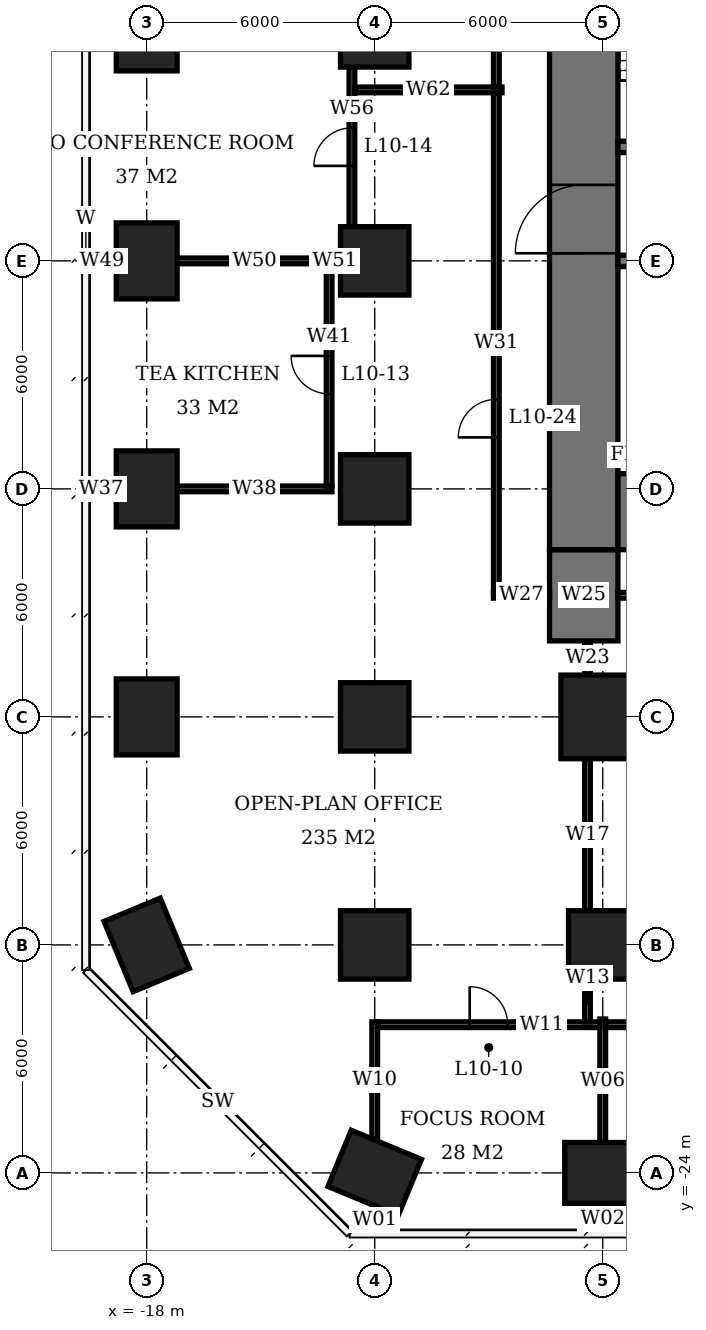
"""IFC4 building model, lengths in metres.
Left out: names, types, materials, properties, quantities, classifications, styles, units other than length and angle.
Written with IfcOpenShell. Run it as: python <this file> out.ifc"""

import sys

from ifc_helpers import new_model, si_unit, direction, frame, frame_2d, origin, origin_2d, place, context, subcontext, project, spatial, rectangle, extrude, element, fill, save


model = new_model("IFC4")
c1 = context("Model", 3, precision=1e-05, world=origin(), true_north=direction((0.0, 1.0)))
c2 = subcontext(c1, "Body", "Model", "MODEL_VIEW")
j1 = project(units=[si_unit("LENGTHUNIT", "METRE"), si_unit("PLANEANGLEUNIT", "RADIAN")], contexts=[c1])
p1 = place(None, origin())
s1 = spatial("IfcSite", under=j1, at=p1, CompositionType="ELEMENT")
p2 = place(p1, origin())
s2 = spatial("IfcBuilding", under=s1, at=p2, CompositionType="ELEMENT")
p3 = place(p2, frame((0.0, 0.0, 45.5)))
s3 = spatial("IfcBuildingStorey", under=s2, at=p3, CompositionType="ELEMENT", Elevation=45.5)
for number, where, z_axis, x_axis in (
    (1, (-18.0, -18.0, 0.0), (0.0, 0.0, 1.0), (-0.383, 0.924, 0.0)),
    (2, (-18.0, -12.0, 0.0), (0.0, 0.0, 1.0), (0.0, 1.0, 0.0)),
    (3, (-18.0, -6.0, 0.0), (0.0, 0.0, 1.0), (0.0, 1.0, 0.0)),
    (4, (-18.0, 0.0, 0.0), (0.0, 0.0, 1.0), (0.0, 1.0, 0.0)),
    (5, (-18.0, 6.0, 0.0), (0.0, 0.0, 1.0), (0.0, 1.0, 0.0)),
    (6, (-12.0, -24.0, 0.0), (0.0, 0.0, 1.0), (-0.924, 0.383, 0.0)),
):
    element("IfcColumn", number, at=place(p3, frame(where, z_axis=z_axis, x_axis=x_axis)), inside=s3, PredefinedType="COLUMN", context=c2, shape_type="SweptSolid", body=[
        extrude(rectangle(XDim=2.0, YDim=1.6, at=origin_2d()), origin(), (0.0, 0.0, 1.0), 3.9),
    ])
for number, where, z_axis, x_axis in (
    (7, (-12.0, -18.0, 0.0), (0.0, 0.0, 1.0), (1.0, 0.0, 0.0)),
    (8, (-12.0, -12.0, 0.0), (0.0, 0.0, 1.0), (1.0, 0.0, 0.0)),
    (9, (-12.0, -6.0, 0.0), (0.0, 0.0, 1.0), (1.0, 0.0, 0.0)),
    (10, (-12.0, 0.0, 0.0), (0.0, 0.0, 1.0), (1.0, 0.0, 0.0)),
    (11, (-12.0, 6.0, 0.0), (0.0, 0.0, 1.0), (1.0, 0.0, 0.0)),
):
    element("IfcColumn", number, at=place(p3, frame(where, z_axis=z_axis, x_axis=x_axis)), inside=s3, PredefinedType="COLUMN", context=c2, shape_type="SweptSolid", body=[
        extrude(rectangle(XDim=1.8, YDim=1.8, at=origin_2d()), origin(), (0.0, 0.0, 1.0), 3.9),
    ])
p4 = place(p3, frame((-6.0, -24.0, 0.0), z_axis=(0.0, 0.0, 1.0), x_axis=(1.0, 0.0, 0.0)))
e12 = element("IfcColumn", 12, at=p4, inside=s3, PredefinedType="COLUMN", context=c2, shape_type="SweptSolid", body=[
    extrude(rectangle(XDim=2.0, YDim=1.6, at=origin_2d()), origin(), (0.0, 0.0, 1.0), 3.9),
])
p5 = place(p3, frame((-6.0, -18.0, 0.0), z_axis=(0.0, 0.0, 1.0), x_axis=(1.0, 0.0, 0.0)))
e13 = element("IfcColumn", 13, at=p5, inside=s3, PredefinedType="COLUMN", context=c2, shape_type="SweptSolid", body=[
    extrude(rectangle(XDim=1.8, YDim=1.8, at=origin_2d()), origin(), (0.0, 0.0, 1.0), 3.9),
])
p6 = place(p3, frame((-6.0, -12.0, 0.0), z_axis=(0.0, 0.0, 1.0), x_axis=(1.0, 0.0, 0.0)))
e14 = element("IfcColumn", 14, at=p6, inside=s3, PredefinedType="COLUMN", context=c2, shape_type="SweptSolid", body=[
    extrude(rectangle(XDim=2.2, YDim=2.2, at=origin_2d()), origin(), (0.0, 0.0, 1.0), 3.9),
])
p7 = place(p3, frame((-5.6, -6.6, 0.0), z_axis=(0.0, 0.0, 1.0), x_axis=(1.0, 0.0, 0.0)))
e15 = element("IfcWall", 15, at=p7, inside=s3, PredefinedType="SHEAR", context=c2, shape_type="SweptSolid", body=[
    extrude(rectangle(XDim=23.2, YDim=2.0, at=frame_2d((11.6, 0.0))), origin(), (0.0, 0.0, 1.0), 3.9),
])
p8 = place(p3, frame((-6.5, -7.6, 0.0), z_axis=(0.0, 0.0, 1.0), x_axis=(0.0, 1.0, 0.0)))
e16 = element("IfcWall", 16, at=p8, inside=s3, PredefinedType="SHEAR", context=c2, shape_type="SweptSolid", body=[
    extrude(rectangle(XDim=21.2, YDim=1.8, at=frame_2d((10.6, 0.0))), origin(), (0.0, 0.0, 1.0), 3.9),
])
p9 = place(p8, frame((7.8, 0.0, 0.0)))
e17 = element("IfcOpeningElement", 17, at=p9, cuts=e16, PredefinedType="OPENING", context=c2, shape_type="SweptSolid", body=[
    extrude(rectangle(XDim=1.8, YDim=2.4, at=frame_2d((0.9, 1.2))), frame((0.0, 0.91, 0.0), z_axis=(0.0, -1.0, 0.0), x_axis=(1.0, 0.0, 0.0)), (0.0, 0.0, 1.0), 1.82),
])
p10 = place(p3, frame((-6.5, -10.0, 0.0), z_axis=(0.0, 0.0, 1.0), x_axis=(0.0, 1.0, 0.0)))
e18 = element("IfcWall", 18, at=p10, inside=s3, PredefinedType="SHEAR", context=c2, shape_type="SweptSolid", body=[
    extrude(rectangle(XDim=2.4, YDim=1.8, at=frame_2d((1.2, 0.0))), origin(), (0.0, 0.0, 1.0), 3.9),
])
p11 = place(p3, frame((-5.6, 0.0, 0.0), z_axis=(0.0, 0.0, 1.0), x_axis=(1.0, 0.0, 0.0)))
e19 = element("IfcWall", 19, at=p11, inside=s3, PredefinedType="SHEAR", context=c2, shape_type="SweptSolid", body=[
    extrude(rectangle(XDim=17.75, YDim=0.3, at=frame_2d((8.875, 0.0))), origin(), (0.0, 0.0, 1.0), 3.9),
])
p12 = place(p11, frame((0.6, 0.0, 0.0)))
e20 = element("IfcOpeningElement", 20, at=p12, cuts=e19, PredefinedType="OPENING", context=c2, shape_type="SweptSolid", body=[
    extrude(rectangle(XDim=0.9, YDim=2.1, at=frame_2d((0.45, 1.05))), frame((0.0, 0.16, 0.0), z_axis=(0.0, -1.0, 0.0), x_axis=(1.0, 0.0, 0.0)), (0.0, 0.0, 1.0), 0.32),
])
p13 = place(p11, frame((3.7, 0.0, 0.0)))
e21 = element("IfcOpeningElement", 21, at=p13, cuts=e19, PredefinedType="OPENING", context=c2, shape_type="SweptSolid", body=[
    extrude(rectangle(XDim=1.0, YDim=2.1, at=frame_2d((0.5, 1.05))), frame((0.0, 0.16, 0.0), z_axis=(0.0, -1.0, 0.0), x_axis=(1.0, 0.0, 0.0)), (0.0, 0.0, 1.0), 0.32),
])
p14 = place(p3, frame((-5.6, 3.0, 0.0), z_axis=(0.0, 0.0, 1.0), x_axis=(1.0, 0.0, 0.0)))
e22 = element("IfcWall", 22, at=p14, inside=s3, PredefinedType="SHEAR", context=c2, shape_type="SweptSolid", body=[
    extrude(rectangle(XDim=5.45, YDim=0.3, at=frame_2d((2.725, 0.0))), origin(), (0.0, 0.0, 1.0), 3.9),
])
p15 = place(p14, frame((0.4, 0.0, 0.0)))
e23 = element("IfcOpeningElement", 23, at=p15, cuts=e22, PredefinedType="OPENING", context=c2, shape_type="SweptSolid", body=[
    extrude(rectangle(XDim=1.2, YDim=2.1, at=frame_2d((0.6, 1.05))), frame((0.0, 0.16, 0.0), z_axis=(0.0, -1.0, 0.0), x_axis=(1.0, 0.0, 0.0)), (0.0, 0.0, 1.0), 0.32),
])
p16 = place(p14, frame((3.95, 0.0, 0.0)))
e24 = element("IfcOpeningElement", 24, at=p16, cuts=e22, PredefinedType="OPENING", context=c2, shape_type="SweptSolid", body=[
    extrude(rectangle(XDim=0.9, YDim=2.1, at=frame_2d((0.45, 1.05))), frame((0.0, 0.16, 0.0), z_axis=(0.0, -1.0, 0.0), x_axis=(1.0, 0.0, 0.0)), (0.0, 0.0, 1.0), 0.32),
])
p17 = place(p3, frame((-11.925, -20.1, 0.0), z_axis=(0.0, 0.0, 1.0), x_axis=(1.0, 0.0, 0.0)))
e25 = element("IfcWall", 25, at=p17, inside=s3, PredefinedType="PARTITIONING", context=c2, shape_type="SweptSolid", body=[
    extrude(rectangle(XDim=5.85, YDim=0.15, at=frame_2d((2.925, 0.0))), origin(), (0.0, 0.0, 1.0), 3.65),
])
p18 = place(p17, frame((2.425, 0.0, 0.0)))
e26 = element("IfcOpeningElement", 26, at=p18, cuts=e25, PredefinedType="OPENING", context=c2, shape_type="SweptSolid", body=[
    extrude(rectangle(XDim=1.0, YDim=2.1, at=frame_2d((0.5, 1.05))), frame((0.0, 0.085, 0.0), z_axis=(0.0, -1.0, 0.0), x_axis=(1.0, 0.0, 0.0)), (0.0, 0.0, 1.0), 0.17),
])
p19 = place(p3, frame((-5.925, -20.1, 0.0), z_axis=(0.0, 0.0, 1.0), x_axis=(1.0, 0.0, 0.0)))
e27 = element("IfcWall", 27, at=p19, inside=s3, PredefinedType="PARTITIONING", context=c2, shape_type="SweptSolid", body=[
    extrude(rectangle(XDim=5.85, YDim=0.15, at=frame_2d((2.925, 0.0))), origin(), (0.0, 0.0, 1.0), 3.65),
])
p20 = place(p19, frame((2.425, 0.0, 0.0)))
e28 = element("IfcOpeningElement", 28, at=p20, cuts=e27, PredefinedType="OPENING", context=c2, shape_type="SweptSolid", body=[
    extrude(rectangle(XDim=1.0, YDim=2.1, at=frame_2d((0.5, 1.05))), frame((0.0, 0.085, 0.0), z_axis=(0.0, -1.0, 0.0), x_axis=(1.0, 0.0, 0.0)), (0.0, 0.0, 1.0), 0.17),
])
p21 = place(p3, frame((-19.6, -6.0, 0.0), z_axis=(0.0, 0.0, 1.0), x_axis=(1.0, 0.0, 0.0)))
e29 = element("IfcWall", 29, at=p21, inside=s3, PredefinedType="PARTITIONING", context=c2, shape_type="SweptSolid", body=[
    extrude(rectangle(XDim=0.8, YDim=0.15, at=frame_2d((0.4, 0.0))), origin(), (0.0, 0.0, 1.0), 3.65),
])
p22 = place(p3, frame((-17.2, -6.0, 0.0), z_axis=(0.0, 0.0, 1.0), x_axis=(1.0, 0.0, 0.0)))
e30 = element("IfcWall", 30, at=p22, inside=s3, PredefinedType="PARTITIONING", context=c2, shape_type="SweptSolid", body=[
    extrude(rectangle(XDim=4.075, YDim=0.15, at=frame_2d((2.038, 0.0))), origin(), (0.0, 0.0, 1.0), 3.65),
])
p23 = place(p3, frame((-19.55, 0.0, 0.0), z_axis=(0.0, 0.0, 1.0), x_axis=(1.0, 0.0, 0.0)))
e31 = element("IfcWall", 31, at=p23, inside=s3, PredefinedType="PARTITIONING", context=c2, shape_type="SweptSolid", body=[
    extrude(rectangle(XDim=0.75, YDim=0.15, at=frame_2d((0.375, 0.0))), origin(), (0.0, 0.0, 1.0), 3.65),
])
p24 = place(p3, frame((-17.2, 0.0, 0.0), z_axis=(0.0, 0.0, 1.0), x_axis=(1.0, 0.0, 0.0)))
e32 = element("IfcWall", 32, at=p24, inside=s3, PredefinedType="PARTITIONING", context=c2, shape_type="SweptSolid", body=[
    extrude(rectangle(XDim=4.075, YDim=0.15, at=frame_2d((2.038, 0.0))), origin(), (0.0, 0.0, 1.0), 3.65),
])
p25 = place(p3, frame((-13.2, 0.0, 0.0), z_axis=(0.0, 0.0, 1.0), x_axis=(1.0, 0.0, 0.0)))
e33 = element("IfcWall", 33, at=p25, inside=s3, PredefinedType="PARTITIONING", context=c2, shape_type="SweptSolid", body=[
    extrude(rectangle(XDim=0.3, YDim=0.15, at=frame_2d((0.15, 0.0))), origin(), (0.0, 0.0, 1.0), 3.65),
])
p26 = place(p3, frame((-13.2, -5.925, 0.0), z_axis=(0.0, 0.0, 1.0), x_axis=(0.0, 1.0, 0.0)))
e34 = element("IfcWall", 34, at=p26, inside=s3, PredefinedType="PARTITIONING", context=c2, shape_type="SweptSolid", body=[
    extrude(rectangle(XDim=5.85, YDim=0.15, at=frame_2d((2.925, 0.0))), origin(), (0.0, 0.0, 1.0), 3.65),
])
p27 = place(p26, frame((2.425, 0.0, 0.0)))
e35 = element("IfcOpeningElement", 35, at=p27, cuts=e34, PredefinedType="OPENING", context=c2, shape_type="SweptSolid", body=[
    extrude(rectangle(XDim=1.0, YDim=2.1, at=frame_2d((0.5, 1.05))), frame((0.0, 0.085, 0.0), z_axis=(0.0, -1.0, 0.0), x_axis=(1.0, 0.0, 0.0)), (0.0, 0.0, 1.0), 0.17),
])
p28 = place(p3, frame((-12.6, 0.9, 0.0), z_axis=(0.0, 0.0, 1.0), x_axis=(0.0, 1.0, 0.0)))
e36 = element("IfcWall", 36, at=p28, inside=s3, PredefinedType="PARTITIONING", context=c2, shape_type="SweptSolid", body=[
    extrude(rectangle(XDim=4.2, YDim=0.15, at=frame_2d((2.1, 0.0))), origin(), (0.0, 0.0, 1.0), 3.65),
])
p29 = place(p28, frame((1.6, 0.0, 0.0)))
e37 = element("IfcOpeningElement", 37, at=p29, cuts=e36, PredefinedType="OPENING", context=c2, shape_type="SweptSolid", body=[
    extrude(rectangle(XDim=1.0, YDim=2.1, at=frame_2d((0.5, 1.05))), frame((0.0, 0.085, 0.0), z_axis=(0.0, -1.0, 0.0), x_axis=(1.0, 0.0, 0.0)), (0.0, 0.0, 1.0), 0.17),
])
p30 = place(p3, frame((-12.0, -25.6, 0.0), z_axis=(0.0, 0.0, 1.0), x_axis=(0.0, 1.0, 0.0)))
e38 = element("IfcWall", 38, at=p30, inside=s3, PredefinedType="PARTITIONING", context=c2, shape_type="SweptSolid", body=[
    extrude(rectangle(XDim=0.703, YDim=0.15, at=frame_2d((0.352, 0.0))), origin(), (0.0, 0.0, 1.0), 3.65),
])
p31 = place(p3, frame((-12.0, -23.103, 0.0), z_axis=(0.0, 0.0, 1.0), x_axis=(0.0, 1.0, 0.0)))
e39 = element("IfcWall", 39, at=p31, inside=s3, PredefinedType="PARTITIONING", context=c2, shape_type="SweptSolid", body=[
    extrude(rectangle(XDim=3.078, YDim=0.15, at=frame_2d((1.539, 0.0))), origin(), (0.0, 0.0, 1.0), 3.65),
])
p32 = place(p3, frame((-6.0, -25.6, 0.0), z_axis=(0.0, 0.0, 1.0), x_axis=(0.0, 1.0, 0.0)))
e40 = element("IfcWall", 40, at=p32, inside=s3, PredefinedType="PARTITIONING", context=c2, shape_type="SweptSolid", body=[
    extrude(rectangle(XDim=0.8, YDim=0.15, at=frame_2d((0.4, 0.0))), origin(), (0.0, 0.0, 1.0), 3.65),
])
p33 = place(p3, frame((-6.0, -23.2, 0.0), z_axis=(0.0, 0.0, 1.0), x_axis=(0.0, 1.0, 0.0)))
e41 = element("IfcWall", 41, at=p33, inside=s3, PredefinedType="PARTITIONING", context=c2, shape_type="SweptSolid", body=[
    extrude(rectangle(XDim=3.25, YDim=0.15, at=frame_2d((1.625, 0.0))), origin(), (0.0, 0.0, 1.0), 3.65),
])
p34 = place(p3, frame((-12.525, 4.5, 0.0), z_axis=(0.0, 0.0, 1.0), x_axis=(1.0, 0.0, 0.0)))
e42 = element("IfcWall", 42, at=p34, inside=s3, PredefinedType="PARTITIONING", context=c2, shape_type="SweptSolid", body=[
    extrude(rectangle(XDim=3.875, YDim=0.15, at=frame_2d((1.938, 0.0))), origin(), (0.0, 0.0, 1.0), 3.65),
])
p35 = place(p3, frame((-8.8, -8.725, 0.0), z_axis=(0.0, 0.0, 1.0), x_axis=(0.0, 1.0, 0.0)))
e43 = element("IfcWall", 43, at=p35, inside=s3, PredefinedType="PARTITIONING", context=c2, shape_type="SweptSolid", body=[
    extrude(rectangle(XDim=13.15, YDim=0.15, at=frame_2d((6.575, 0.0))), origin(), (0.0, 0.0, 1.0), 3.65),
])
p36 = place(p35, frame((4.08, 0.0, 0.0)))
e44 = element("IfcOpeningElement", 44, at=p36, cuts=e43, PredefinedType="OPENING", context=c2, shape_type="SweptSolid", body=[
    extrude(rectangle(XDim=1.0, YDim=2.1, at=frame_2d((0.5, 1.05))), frame((0.0, 0.085, 0.0), z_axis=(0.0, -1.0, 0.0), x_axis=(1.0, 0.0, 0.0)), (0.0, 0.0, 1.0), 0.17),
])
p37 = place(p3, frame((-8.875, -8.8, 0.0), z_axis=(0.0, 0.0, 1.0), x_axis=(1.0, 0.0, 0.0)))
e45 = element("IfcWall", 45, at=p37, inside=s3, PredefinedType="PARTITIONING", context=c2, shape_type="SweptSolid", body=[
    extrude(rectangle(XDim=1.475, YDim=0.15, at=frame_2d((0.738, 0.0))), origin(), (0.0, 0.0, 1.0), 3.65),
])
p38 = place(p3, frame((-8.8, 4.575, 0.0), z_axis=(0.0, 0.0, 1.0), x_axis=(0.0, 1.0, 0.0)))
e46 = element("IfcWall", 46, at=p38, inside=s3, PredefinedType="PARTITIONING", context=c2, shape_type="SweptSolid", body=[
    extrude(rectangle(XDim=10.15, YDim=0.15, at=frame_2d((5.075, 0.0))), origin(), (0.0, 0.0, 1.0), 3.65),
])
p39 = place(p38, frame((6.12, 0.0, 0.0)))
e47 = element("IfcOpeningElement", 47, at=p39, cuts=e46, PredefinedType="OPENING", context=c2, shape_type="SweptSolid", body=[
    extrude(rectangle(XDim=1.0, YDim=2.1, at=frame_2d((0.5, 1.05))), frame((0.0, 0.085, 0.0), z_axis=(0.0, -1.0, 0.0), x_axis=(1.0, 0.0, 0.0)), (0.0, 0.0, 1.0), 0.17),
])
p40 = place(p3, frame((-6.4, -20.025, 0.0), z_axis=(0.0, 0.0, 1.0), x_axis=(0.0, 1.0, 0.0)))
e48 = element("IfcWall", 48, at=p40, inside=s3, PredefinedType="PARTITIONING", context=c2, shape_type="SweptSolid", body=[
    extrude(rectangle(XDim=1.125, YDim=0.15, at=frame_2d((0.562, 0.0))), origin(), (0.0, 0.0, 1.0), 3.65),
])
p41 = place(p3, frame((-6.4, -17.1, 0.0), z_axis=(0.0, 0.0, 1.0), x_axis=(0.0, 1.0, 0.0)))
e49 = element("IfcWall", 49, at=p41, inside=s3, PredefinedType="PARTITIONING", context=c2, shape_type="SweptSolid", body=[
    extrude(rectangle(XDim=4.0, YDim=0.15, at=frame_2d((2.0, 0.0))), origin(), (0.0, 0.0, 1.0), 3.65),
])
p42 = place(p3, frame((-6.4, -10.9, 0.0), z_axis=(0.0, 0.0, 1.0), x_axis=(0.0, 1.0, 0.0)))
e50 = element("IfcWall", 50, at=p42, inside=s3, PredefinedType="PARTITIONING", context=c2, shape_type="SweptSolid", body=[
    extrude(rectangle(XDim=0.9, YDim=0.15, at=frame_2d((0.45, 0.0))), origin(), (0.0, 0.0, 1.0), 3.65),
])
p43 = place(p3, frame((-5.6, -8.8, 0.0), z_axis=(0.0, 0.0, 1.0), x_axis=(1.0, 0.0, 0.0)))
e51 = element("IfcWall", 51, at=p43, inside=s3, PredefinedType="PARTITIONING", context=c2, shape_type="SweptSolid", body=[
    extrude(rectangle(XDim=10.025, YDim=0.15, at=frame_2d((5.013, 0.0))), origin(), (0.0, 0.0, 1.0), 3.65),
])
p44 = place(p43, frame((3.035, 0.0, 0.0)))
e52 = element("IfcOpeningElement", 52, at=p44, cuts=e51, PredefinedType="OPENING", context=c2, shape_type="SweptSolid", body=[
    extrude(rectangle(XDim=1.0, YDim=2.1, at=frame_2d((0.5, 1.05))), frame((0.0, 0.085, 0.0), z_axis=(0.0, -1.0, 0.0), x_axis=(1.0, 0.0, 0.0)), (0.0, 0.0, 1.0), 0.17),
])
p45 = place(p9, origin())
e53 = element("IfcDoor", 53, at=p45, inside=s3, OperationType="DOUBLE_DOOR_SINGLE_SWING", PredefinedType="DOOR", context=c2, shape_type="SweptSolid", body=[
    extrude(rectangle(XDim=1.8, YDim=2.4, at=frame_2d((0.9, 1.2))), frame((0.0, 0.025, 0.0), z_axis=(0.0, -1.0, 0.0), x_axis=(1.0, 0.0, 0.0)), (0.0, 0.0, 1.0), 0.05),
])
fill(e17, e53)
p46 = place(p18, origin())
e54 = element("IfcDoor", 54, at=p46, inside=s3, OperationType="SINGLE_SWING_LEFT", PredefinedType="DOOR", context=c2, shape_type="SweptSolid", body=[
    extrude(rectangle(XDim=1.0, YDim=2.1, at=frame_2d((0.5, 1.05))), frame((0.0, 0.025, 0.0), z_axis=(0.0, -1.0, 0.0), x_axis=(1.0, 0.0, 0.0)), (0.0, 0.0, 1.0), 0.05),
])
fill(e26, e54)
p47 = place(p27, origin())
e55 = element("IfcDoor", 55, at=p47, inside=s3, OperationType="SINGLE_SWING_RIGHT", PredefinedType="DOOR", context=c2, shape_type="SweptSolid", body=[
    extrude(rectangle(XDim=1.0, YDim=2.1, at=frame_2d((0.5, 1.05))), frame((0.0, 0.025, 0.0), z_axis=(0.0, -1.0, 0.0), x_axis=(1.0, 0.0, 0.0)), (0.0, 0.0, 1.0), 0.05),
])
fill(e35, e55)
p48 = place(p29, origin())
e56 = element("IfcDoor", 56, at=p48, inside=s3, OperationType="SINGLE_SWING_LEFT", PredefinedType="DOOR", context=c2, shape_type="SweptSolid", body=[
    extrude(rectangle(XDim=1.0, YDim=2.1, at=frame_2d((0.5, 1.05))), frame((0.0, 0.025, 0.0), z_axis=(0.0, -1.0, 0.0), x_axis=(1.0, 0.0, 0.0)), (0.0, 0.0, 1.0), 0.05),
])
fill(e37, e56)
p49 = place(p36, origin())
e57 = element("IfcDoor", 57, at=p49, inside=s3, OperationType="SINGLE_SWING_LEFT", PredefinedType="DOOR", context=c2, shape_type="SweptSolid", body=[
    extrude(rectangle(XDim=1.0, YDim=2.1, at=frame_2d((0.5, 1.05))), frame((0.0, 0.025, 0.0), z_axis=(0.0, -1.0, 0.0), x_axis=(1.0, 0.0, 0.0)), (0.0, 0.0, 1.0), 0.05),
])
fill(e44, e57)
save(model, sys.argv[1])
